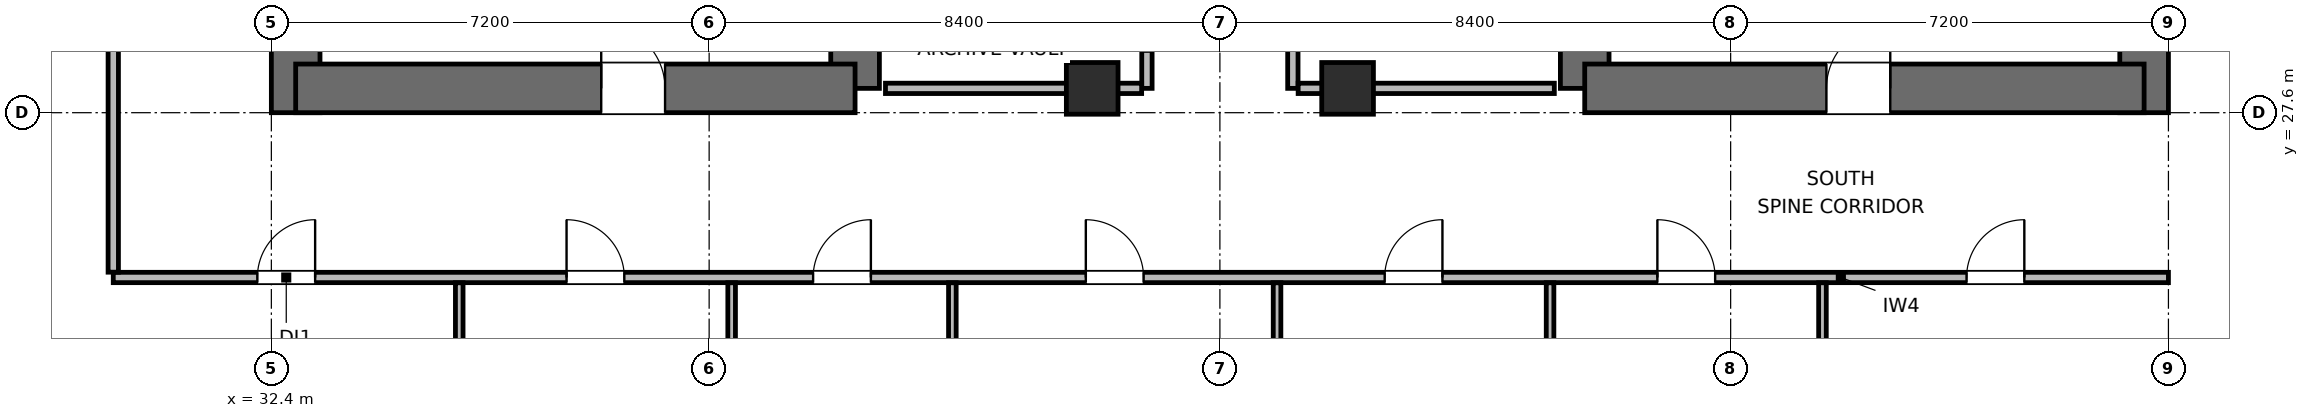
"""IFC4 building model, lengths in metres.
Left out: names, types, materials, properties, quantities, classifications, styles, units other than length and angle.
Written with IfcOpenShell. Run it as: python <this file> out.ifc"""

import sys

from ifc_helpers import new_model, si_unit, direction, frame, frame_2d, origin, origin_2d, place, context, subcontext, project, spatial, rectangle, extrude, element, fill, save


model = new_model("IFC4")
c1 = context("Model", 3, precision=1e-05, world=origin(), true_north=direction((0.0, 1.0)))
c2 = subcontext(c1, "Body", "Model", "MODEL_VIEW")
j1 = project(units=[si_unit("LENGTHUNIT", "METRE"), si_unit("PLANEANGLEUNIT", "RADIAN")], contexts=[c1])
p1 = place(None, origin())
s1 = spatial("IfcSite", under=j1, at=p1, CompositionType="ELEMENT")
p2 = place(p1, origin())
s2 = spatial("IfcBuilding", under=s1, at=p2, CompositionType="ELEMENT")
p3 = place(p2, frame((0.0, 0.0, 162.3)))
s3 = spatial("IfcBuildingStorey", under=s2, at=p3, CompositionType="ELEMENT", Elevation=162.3)
p4 = place(p3, frame((32.8, 27.6, 0.0), z_axis=(0.0, 0.0, 1.0), x_axis=(0.0, 1.0, 0.0)))
e1 = element("IfcWall", 1, at=p4, inside=s3, PredefinedType="SHEAR", context=c2, shape_type="SweptSolid", body=[
    extrude(rectangle(XDim=16.8, YDim=0.8, at=frame_2d((8.4, 0.0))), origin(), (0.0, 0.0, 1.0), 3.9),
])
p5 = place(p3, frame((42.0, 28.0, 0.0), z_axis=(0.0, 0.0, 1.0), x_axis=(0.0, 1.0, 0.0)))
e2 = element("IfcWall", 2, at=p5, inside=s3, PredefinedType="SHEAR", context=c2, shape_type="SweptSolid", body=[
    extrude(rectangle(XDim=6.4, YDim=0.8, at=frame_2d((3.2, 0.0))), origin(), (0.0, 0.0, 1.0), 3.9),
])
p6 = place(p3, frame((32.8, 28.0, 0.0), z_axis=(0.0, 0.0, 1.0), x_axis=(1.0, 0.0, 0.0)))
e3 = element("IfcWall", 3, at=p6, inside=s3, PredefinedType="SHEAR", context=c2, shape_type="SweptSolid", body=[
    extrude(rectangle(XDim=9.2, YDim=0.8, at=frame_2d((4.6, 0.0))), origin(), (0.0, 0.0, 1.0), 3.9),
])
p7 = place(p6, frame((5.025, 0.0, 0.0)))
e4 = element("IfcOpeningElement", 4, at=p7, cuts=e3, PredefinedType="OPENING", context=c2, shape_type="SweptSolid", body=[
    extrude(rectangle(XDim=1.05, YDim=2.04, at=frame_2d((0.525, 1.02))), frame((0.0, 0.41, 0.0), z_axis=(0.0, -1.0, 0.0), x_axis=(1.0, 0.0, 0.0)), (0.0, 0.0, 1.0), 0.82),
])
p8 = place(p3, frame((54.0, 28.0, 0.0), z_axis=(0.0, 0.0, 1.0), x_axis=(0.0, 1.0, 0.0)))
e5 = element("IfcWall", 5, at=p8, inside=s3, PredefinedType="SHEAR", context=c2, shape_type="SweptSolid", body=[
    extrude(rectangle(XDim=7.8, YDim=0.8, at=frame_2d((3.9, 0.0))), origin(), (0.0, 0.0, 1.0), 3.9),
])
p9 = place(p3, frame((63.2, 27.6, 0.0), z_axis=(0.0, 0.0, 1.0), x_axis=(0.0, 1.0, 0.0)))
e6 = element("IfcWall", 6, at=p9, inside=s3, PredefinedType="SHEAR", context=c2, shape_type="SweptSolid", body=[
    extrude(rectangle(XDim=16.8, YDim=0.8, at=frame_2d((8.4, 0.0))), origin(), (0.0, 0.0, 1.0), 3.9),
])
p10 = place(p3, frame((54.0, 28.0, 0.0), z_axis=(0.0, 0.0, 1.0), x_axis=(1.0, 0.0, 0.0)))
e7 = element("IfcWall", 7, at=p10, inside=s3, PredefinedType="SHEAR", context=c2, shape_type="SweptSolid", body=[
    extrude(rectangle(XDim=9.2, YDim=0.8, at=frame_2d((4.6, 0.0))), origin(), (0.0, 0.0, 1.0), 3.9),
])
p11 = place(p10, frame((3.975, 0.0, 0.0)))
e8 = element("IfcOpeningElement", 8, at=p11, cuts=e7, PredefinedType="OPENING", context=c2, shape_type="SweptSolid", body=[
    extrude(rectangle(XDim=1.05, YDim=2.04, at=frame_2d((0.525, 1.02))), frame((0.0, 0.41, 0.0), z_axis=(0.0, -1.0, 0.0), x_axis=(1.0, 0.0, 0.0)), (0.0, 0.0, 1.0), 0.82),
])
for number, where, z_axis, x_axis in (
    (9, (45.9, 28.0, 0.0), (0.0, 0.0, 1.0), (1.0, 0.0, 0.0)),
    (10, (50.1, 28.0, 0.0), (0.0, 0.0, 1.0), (1.0, 0.0, 0.0)),
):
    element("IfcColumn", number, at=place(p3, frame(where, z_axis=z_axis, x_axis=x_axis)), inside=s3, PredefinedType="COLUMN", context=c2, shape_type="SweptSolid", body=[
        extrude(rectangle(XDim=0.85, YDim=0.85, at=origin_2d()), origin(), (0.0, 0.0, 1.0), 3.9),
    ])
p12 = place(p3, frame((46.8, 28.0, 0.0), z_axis=(0.0, 0.0, 1.0), x_axis=(0.0, 1.0, 0.0)))
e11 = element("IfcWall", 11, at=p12, inside=s3, PredefinedType="PARTITIONING", context=c2, shape_type="SweptSolid", body=[
    extrude(rectangle(XDim=4.5, YDim=0.17, at=frame_2d((2.25, 0.0))), origin(), (0.0, 0.0, 1.0), 3.68),
])
p13 = place(p12, frame((0.605, 0.0, 0.0)))
e12 = element("IfcOpeningElement", 12, at=p13, cuts=e11, PredefinedType="OPENING", context=c2, shape_type="SweptSolid", body=[
    extrude(rectangle(XDim=0.9, YDim=2.02, at=frame_2d((0.45, 1.01))), frame((0.0, 0.095, 0.0), z_axis=(0.0, -1.0, 0.0), x_axis=(1.0, 0.0, 0.0)), (0.0, 0.0, 1.0), 0.19),
])
p14 = place(p12, frame((2.655, 0.0, 0.0)))
e13 = element("IfcOpeningElement", 13, at=p14, cuts=e11, PredefinedType="OPENING", context=c2, shape_type="SweptSolid", body=[
    extrude(rectangle(XDim=0.9, YDim=2.02, at=frame_2d((0.45, 1.01))), frame((0.0, 0.095, 0.0), z_axis=(0.0, -1.0, 0.0), x_axis=(1.0, 0.0, 0.0)), (0.0, 0.0, 1.0), 0.19),
])
p15 = place(p3, frame((42.5, 28.0, 0.0), z_axis=(0.0, 0.0, 1.0), x_axis=(1.0, 0.0, 0.0)))
e14 = element("IfcWall", 14, at=p15, inside=s3, PredefinedType="PARTITIONING", context=c2, shape_type="SweptSolid", body=[
    extrude(rectangle(XDim=4.213, YDim=0.17, at=frame_2d((2.106, 0.0))), origin(), (0.0, 0.0, 1.0), 2.765),
])
p16 = place(p3, frame((49.2, 28.0, 0.0), z_axis=(0.0, 0.0, 1.0), x_axis=(0.0, 1.0, 0.0)))
e15 = element("IfcWall", 15, at=p16, inside=s3, PredefinedType="PARTITIONING", context=c2, shape_type="SweptSolid", body=[
    extrude(rectangle(XDim=4.5, YDim=0.17, at=frame_2d((2.25, 0.0))), origin(), (0.0, 0.0, 1.0), 3.68),
])
p17 = place(p16, frame((0.99, 0.0, 0.0)))
e16 = element("IfcOpeningElement", 16, at=p17, cuts=e15, PredefinedType="OPENING", context=c2, shape_type="SweptSolid", body=[
    extrude(rectangle(XDim=0.9, YDim=2.02, at=frame_2d((0.45, 1.01))), frame((0.0, 0.095, 0.0), z_axis=(0.0, -1.0, 0.0), x_axis=(1.0, 0.0, 0.0)), (0.0, 0.0, 1.0), 0.19),
])
p18 = place(p16, frame((3.24, 0.0, 0.0)))
e17 = element("IfcOpeningElement", 17, at=p18, cuts=e15, PredefinedType="OPENING", context=c2, shape_type="SweptSolid", body=[
    extrude(rectangle(XDim=0.9, YDim=2.02, at=frame_2d((0.45, 1.01))), frame((0.0, 0.095, 0.0), z_axis=(0.0, -1.0, 0.0), x_axis=(1.0, 0.0, 0.0)), (0.0, 0.0, 1.0), 0.19),
])
p19 = place(p3, frame((49.287, 28.0, 0.0), z_axis=(0.0, 0.0, 1.0), x_axis=(1.0, 0.0, 0.0)))
e18 = element("IfcWall", 18, at=p19, inside=s3, PredefinedType="PARTITIONING", context=c2, shape_type="SweptSolid", body=[
    extrude(rectangle(XDim=4.213, YDim=0.17, at=frame_2d((2.106, 0.0))), origin(), (0.0, 0.0, 1.0), 2.765),
])
p20 = place(p3, frame((29.8, 24.89, 0.0), z_axis=(0.0, 0.0, 1.0), x_axis=(1.0, 0.0, 0.0)))
e19 = element("IfcWall", 19, at=p20, inside=s3, PredefinedType="PARTITIONING", context=c2, shape_type="SweptSolid", body=[
    extrude(rectangle(XDim=33.8, YDim=0.17, at=frame_2d((16.9, 0.0))), origin(), (0.0, 0.0, 1.0), 3.68),
])
p21 = place(p20, frame((2.37, 0.0, 0.0)))
e20 = element("IfcOpeningElement", 20, at=p21, cuts=e19, PredefinedType="OPENING", context=c2, shape_type="SweptSolid", body=[
    extrude(rectangle(XDim=0.95, YDim=2.04, at=frame_2d((0.475, 1.02))), frame((0.0, 0.095, 0.0), z_axis=(0.0, -1.0, 0.0), x_axis=(1.0, 0.0, 0.0)), (0.0, 0.0, 1.0), 0.19),
])
p22 = place(p20, frame((7.455, 0.0, 0.0)))
e21 = element("IfcOpeningElement", 21, at=p22, cuts=e19, PredefinedType="OPENING", context=c2, shape_type="SweptSolid", body=[
    extrude(rectangle(XDim=0.95, YDim=2.04, at=frame_2d((0.475, 1.02))), frame((0.0, 0.095, 0.0), z_axis=(0.0, -1.0, 0.0), x_axis=(1.0, 0.0, 0.0)), (0.0, 0.0, 1.0), 0.19),
])
p23 = place(p20, frame((11.51, 0.0, 0.0)))
e22 = element("IfcOpeningElement", 22, at=p23, cuts=e19, PredefinedType="OPENING", context=c2, shape_type="SweptSolid", body=[
    extrude(rectangle(XDim=0.95, YDim=2.04, at=frame_2d((0.475, 1.02))), frame((0.0, 0.095, 0.0), z_axis=(0.0, -1.0, 0.0), x_axis=(1.0, 0.0, 0.0)), (0.0, 0.0, 1.0), 0.19),
])
p24 = place(p20, frame((15.995, 0.0, 0.0)))
e23 = element("IfcOpeningElement", 23, at=p24, cuts=e19, PredefinedType="OPENING", context=c2, shape_type="SweptSolid", body=[
    extrude(rectangle(XDim=0.95, YDim=2.04, at=frame_2d((0.475, 1.02))), frame((0.0, 0.095, 0.0), z_axis=(0.0, -1.0, 0.0), x_axis=(1.0, 0.0, 0.0)), (0.0, 0.0, 1.0), 0.19),
])
p25 = place(p20, frame((20.91, 0.0, 0.0)))
e24 = element("IfcOpeningElement", 24, at=p25, cuts=e19, PredefinedType="OPENING", context=c2, shape_type="SweptSolid", body=[
    extrude(rectangle(XDim=0.95, YDim=2.04, at=frame_2d((0.475, 1.02))), frame((0.0, 0.095, 0.0), z_axis=(0.0, -1.0, 0.0), x_axis=(1.0, 0.0, 0.0)), (0.0, 0.0, 1.0), 0.19),
])
p26 = place(p20, frame((25.395, 0.0, 0.0)))
e25 = element("IfcOpeningElement", 25, at=p26, cuts=e19, PredefinedType="OPENING", context=c2, shape_type="SweptSolid", body=[
    extrude(rectangle(XDim=0.95, YDim=2.04, at=frame_2d((0.475, 1.02))), frame((0.0, 0.095, 0.0), z_axis=(0.0, -1.0, 0.0), x_axis=(1.0, 0.0, 0.0)), (0.0, 0.0, 1.0), 0.19),
])
p27 = place(p20, frame((30.48, 0.0, 0.0)))
e26 = element("IfcOpeningElement", 26, at=p27, cuts=e19, PredefinedType="OPENING", context=c2, shape_type="SweptSolid", body=[
    extrude(rectangle(XDim=0.95, YDim=2.04, at=frame_2d((0.475, 1.02))), frame((0.0, 0.095, 0.0), z_axis=(0.0, -1.0, 0.0), x_axis=(1.0, 0.0, 0.0)), (0.0, 0.0, 1.0), 0.19),
])
p28 = place(p3, frame((29.8, 24.977, 0.0), z_axis=(0.0, 0.0, 1.0), x_axis=(0.0, 1.0, 0.0)))
e27 = element("IfcWall", 27, at=p28, inside=s3, PredefinedType="PARTITIONING", context=c2, shape_type="SweptSolid", body=[
    extrude(rectangle(XDim=9.423, YDim=0.17, at=frame_2d((4.711, 0.0))), origin(), (0.0, 0.0, 1.0), 3.68),
])
p29 = place(p28, frame((4.193, 0.0, 0.0)))
e28 = element("IfcOpeningElement", 28, at=p29, cuts=e27, PredefinedType="OPENING", context=c2, shape_type="SweptSolid", body=[
    extrude(rectangle(XDim=0.95, YDim=2.04, at=frame_2d((0.475, 1.02))), frame((0.0, 0.095, 0.0), z_axis=(0.0, -1.0, 0.0), x_axis=(1.0, 0.0, 0.0)), (0.0, 0.0, 1.0), 0.19),
])
p30 = place(p3, frame((35.49, 18.875, 0.0), z_axis=(0.0, 0.0, 1.0), x_axis=(0.0, 1.0, 0.0)))
e29 = element("IfcWall", 29, at=p30, inside=s3, PredefinedType="PARTITIONING", context=c2, shape_type="SweptSolid", body=[
    extrude(rectangle(XDim=5.928, YDim=0.125, at=frame_2d((2.964, 0.0))), origin(), (0.0, 0.0, 1.0), 3.68),
])
p31 = place(p3, frame((39.97, 18.875, 0.0), z_axis=(0.0, 0.0, 1.0), x_axis=(0.0, 1.0, 0.0)))
e30 = element("IfcWall", 30, at=p31, inside=s3, PredefinedType="PARTITIONING", context=c2, shape_type="SweptSolid", body=[
    extrude(rectangle(XDim=5.928, YDim=0.125, at=frame_2d((2.964, 0.0))), origin(), (0.0, 0.0, 1.0), 3.043),
])
p32 = place(p3, frame((43.6, 22.555, 0.0), z_axis=(0.0, 0.0, 1.0), x_axis=(0.0, 1.0, 0.0)))
e31 = element("IfcWall", 31, at=p32, inside=s3, PredefinedType="PARTITIONING", context=c2, shape_type="SweptSolid", body=[
    extrude(rectangle(XDim=2.248, YDim=0.125, at=frame_2d((1.124, 0.0))), origin(), (0.0, 0.0, 1.0), 3.043),
])
p33 = place(p3, frame((48.94, 20.475, 0.0), z_axis=(0.0, 0.0, 1.0), x_axis=(0.0, 1.0, 0.0)))
e32 = element("IfcWall", 32, at=p33, inside=s3, PredefinedType="PARTITIONING", context=c2, shape_type="SweptSolid", body=[
    extrude(rectangle(XDim=4.328, YDim=0.125, at=frame_2d((2.164, 0.0))), origin(), (0.0, 0.0, 1.0), 3.68),
])
p34 = place(p3, frame((53.43, 19.653, 0.0), z_axis=(0.0, 0.0, 1.0), x_axis=(0.0, 1.0, 0.0)))
e33 = element("IfcWall", 33, at=p34, inside=s3, PredefinedType="PARTITIONING", context=c2, shape_type="SweptSolid", body=[
    extrude(rectangle(XDim=5.15, YDim=0.125, at=frame_2d((2.575, 0.0))), origin(), (0.0, 0.0, 1.0), 3.043),
])
p35 = place(p3, frame((57.91, 18.875, 0.0), z_axis=(0.0, 0.0, 1.0), x_axis=(0.0, 1.0, 0.0)))
e34 = element("IfcWall", 34, at=p35, inside=s3, PredefinedType="PARTITIONING", context=c2, shape_type="SweptSolid", body=[
    extrude(rectangle(XDim=5.928, YDim=0.125, at=frame_2d((2.964, 0.0))), origin(), (0.0, 0.0, 1.0), 3.68),
])
p36 = place(p7, origin())
e35 = element("IfcDoor", 35, at=p36, inside=s3, OperationType="SINGLE_SWING_LEFT", PredefinedType="DOOR", context=c2, shape_type="SweptSolid", body=[
    extrude(rectangle(XDim=1.05, YDim=2.04, at=frame_2d((0.525, 1.02))), frame((0.0, 0.025, 0.0), z_axis=(0.0, -1.0, 0.0), x_axis=(1.0, 0.0, 0.0)), (0.0, 0.0, 1.0), 0.05),
])
fill(e4, e35)
p37 = place(p11, origin())
e36 = element("IfcDoor", 36, at=p37, inside=s3, OperationType="SINGLE_SWING_RIGHT", PredefinedType="DOOR", context=c2, shape_type="SweptSolid", body=[
    extrude(rectangle(XDim=1.05, YDim=2.04, at=frame_2d((0.525, 1.02))), frame((0.0, 0.025, 0.0), z_axis=(0.0, -1.0, 0.0), x_axis=(1.0, 0.0, 0.0)), (0.0, 0.0, 1.0), 0.05),
])
fill(e8, e36)
p38 = place(p21, origin())
e37 = element("IfcDoor", 37, at=p38, inside=s3, OperationType="SINGLE_SWING_RIGHT", PredefinedType="DOOR", context=c2, shape_type="SweptSolid", body=[
    extrude(rectangle(XDim=0.95, YDim=2.04, at=frame_2d((0.475, 1.02))), frame((0.0, 0.025, 0.0), z_axis=(0.0, -1.0, 0.0), x_axis=(1.0, 0.0, 0.0)), (0.0, 0.0, 1.0), 0.05),
])
fill(e20, e37)
p39 = place(p22, origin())
e38 = element("IfcDoor", 38, at=p39, inside=s3, OperationType="SINGLE_SWING_LEFT", PredefinedType="DOOR", context=c2, shape_type="SweptSolid", body=[
    extrude(rectangle(XDim=0.95, YDim=2.04, at=frame_2d((0.475, 1.02))), frame((0.0, 0.025, 0.0), z_axis=(0.0, -1.0, 0.0), x_axis=(1.0, 0.0, 0.0)), (0.0, 0.0, 1.0), 0.05),
])
fill(e21, e38)
p40 = place(p23, origin())
e39 = element("IfcDoor", 39, at=p40, inside=s3, OperationType="SINGLE_SWING_RIGHT", PredefinedType="DOOR", context=c2, shape_type="SweptSolid", body=[
    extrude(rectangle(XDim=0.95, YDim=2.04, at=frame_2d((0.475, 1.02))), frame((0.0, 0.025, 0.0), z_axis=(0.0, -1.0, 0.0), x_axis=(1.0, 0.0, 0.0)), (0.0, 0.0, 1.0), 0.05),
])
fill(e22, e39)
p41 = place(p24, origin())
e40 = element("IfcDoor", 40, at=p41, inside=s3, OperationType="SINGLE_SWING_LEFT", PredefinedType="DOOR", context=c2, shape_type="SweptSolid", body=[
    extrude(rectangle(XDim=0.95, YDim=2.04, at=frame_2d((0.475, 1.02))), frame((0.0, 0.025, 0.0), z_axis=(0.0, -1.0, 0.0), x_axis=(1.0, 0.0, 0.0)), (0.0, 0.0, 1.0), 0.05),
])
fill(e23, e40)
p42 = place(p25, origin())
e41 = element("IfcDoor", 41, at=p42, inside=s3, OperationType="SINGLE_SWING_RIGHT", PredefinedType="DOOR", context=c2, shape_type="SweptSolid", body=[
    extrude(rectangle(XDim=0.95, YDim=2.04, at=frame_2d((0.475, 1.02))), frame((0.0, 0.025, 0.0), z_axis=(0.0, -1.0, 0.0), x_axis=(1.0, 0.0, 0.0)), (0.0, 0.0, 1.0), 0.05),
])
fill(e24, e41)
p43 = place(p26, origin())
e42 = element("IfcDoor", 42, at=p43, inside=s3, OperationType="SINGLE_SWING_LEFT", PredefinedType="DOOR", context=c2, shape_type="SweptSolid", body=[
    extrude(rectangle(XDim=0.95, YDim=2.04, at=frame_2d((0.475, 1.02))), frame((0.0, 0.025, 0.0), z_axis=(0.0, -1.0, 0.0), x_axis=(1.0, 0.0, 0.0)), (0.0, 0.0, 1.0), 0.05),
])
fill(e25, e42)
p44 = place(p27, origin())
e43 = element("IfcDoor", 43, at=p44, inside=s3, OperationType="SINGLE_SWING_RIGHT", PredefinedType="DOOR", context=c2, shape_type="SweptSolid", body=[
    extrude(rectangle(XDim=0.95, YDim=2.04, at=frame_2d((0.475, 1.02))), frame((0.0, 0.025, 0.0), z_axis=(0.0, -1.0, 0.0), x_axis=(1.0, 0.0, 0.0)), (0.0, 0.0, 1.0), 0.05),
])
fill(e26, e43)
save(model, sys.argv[1])
